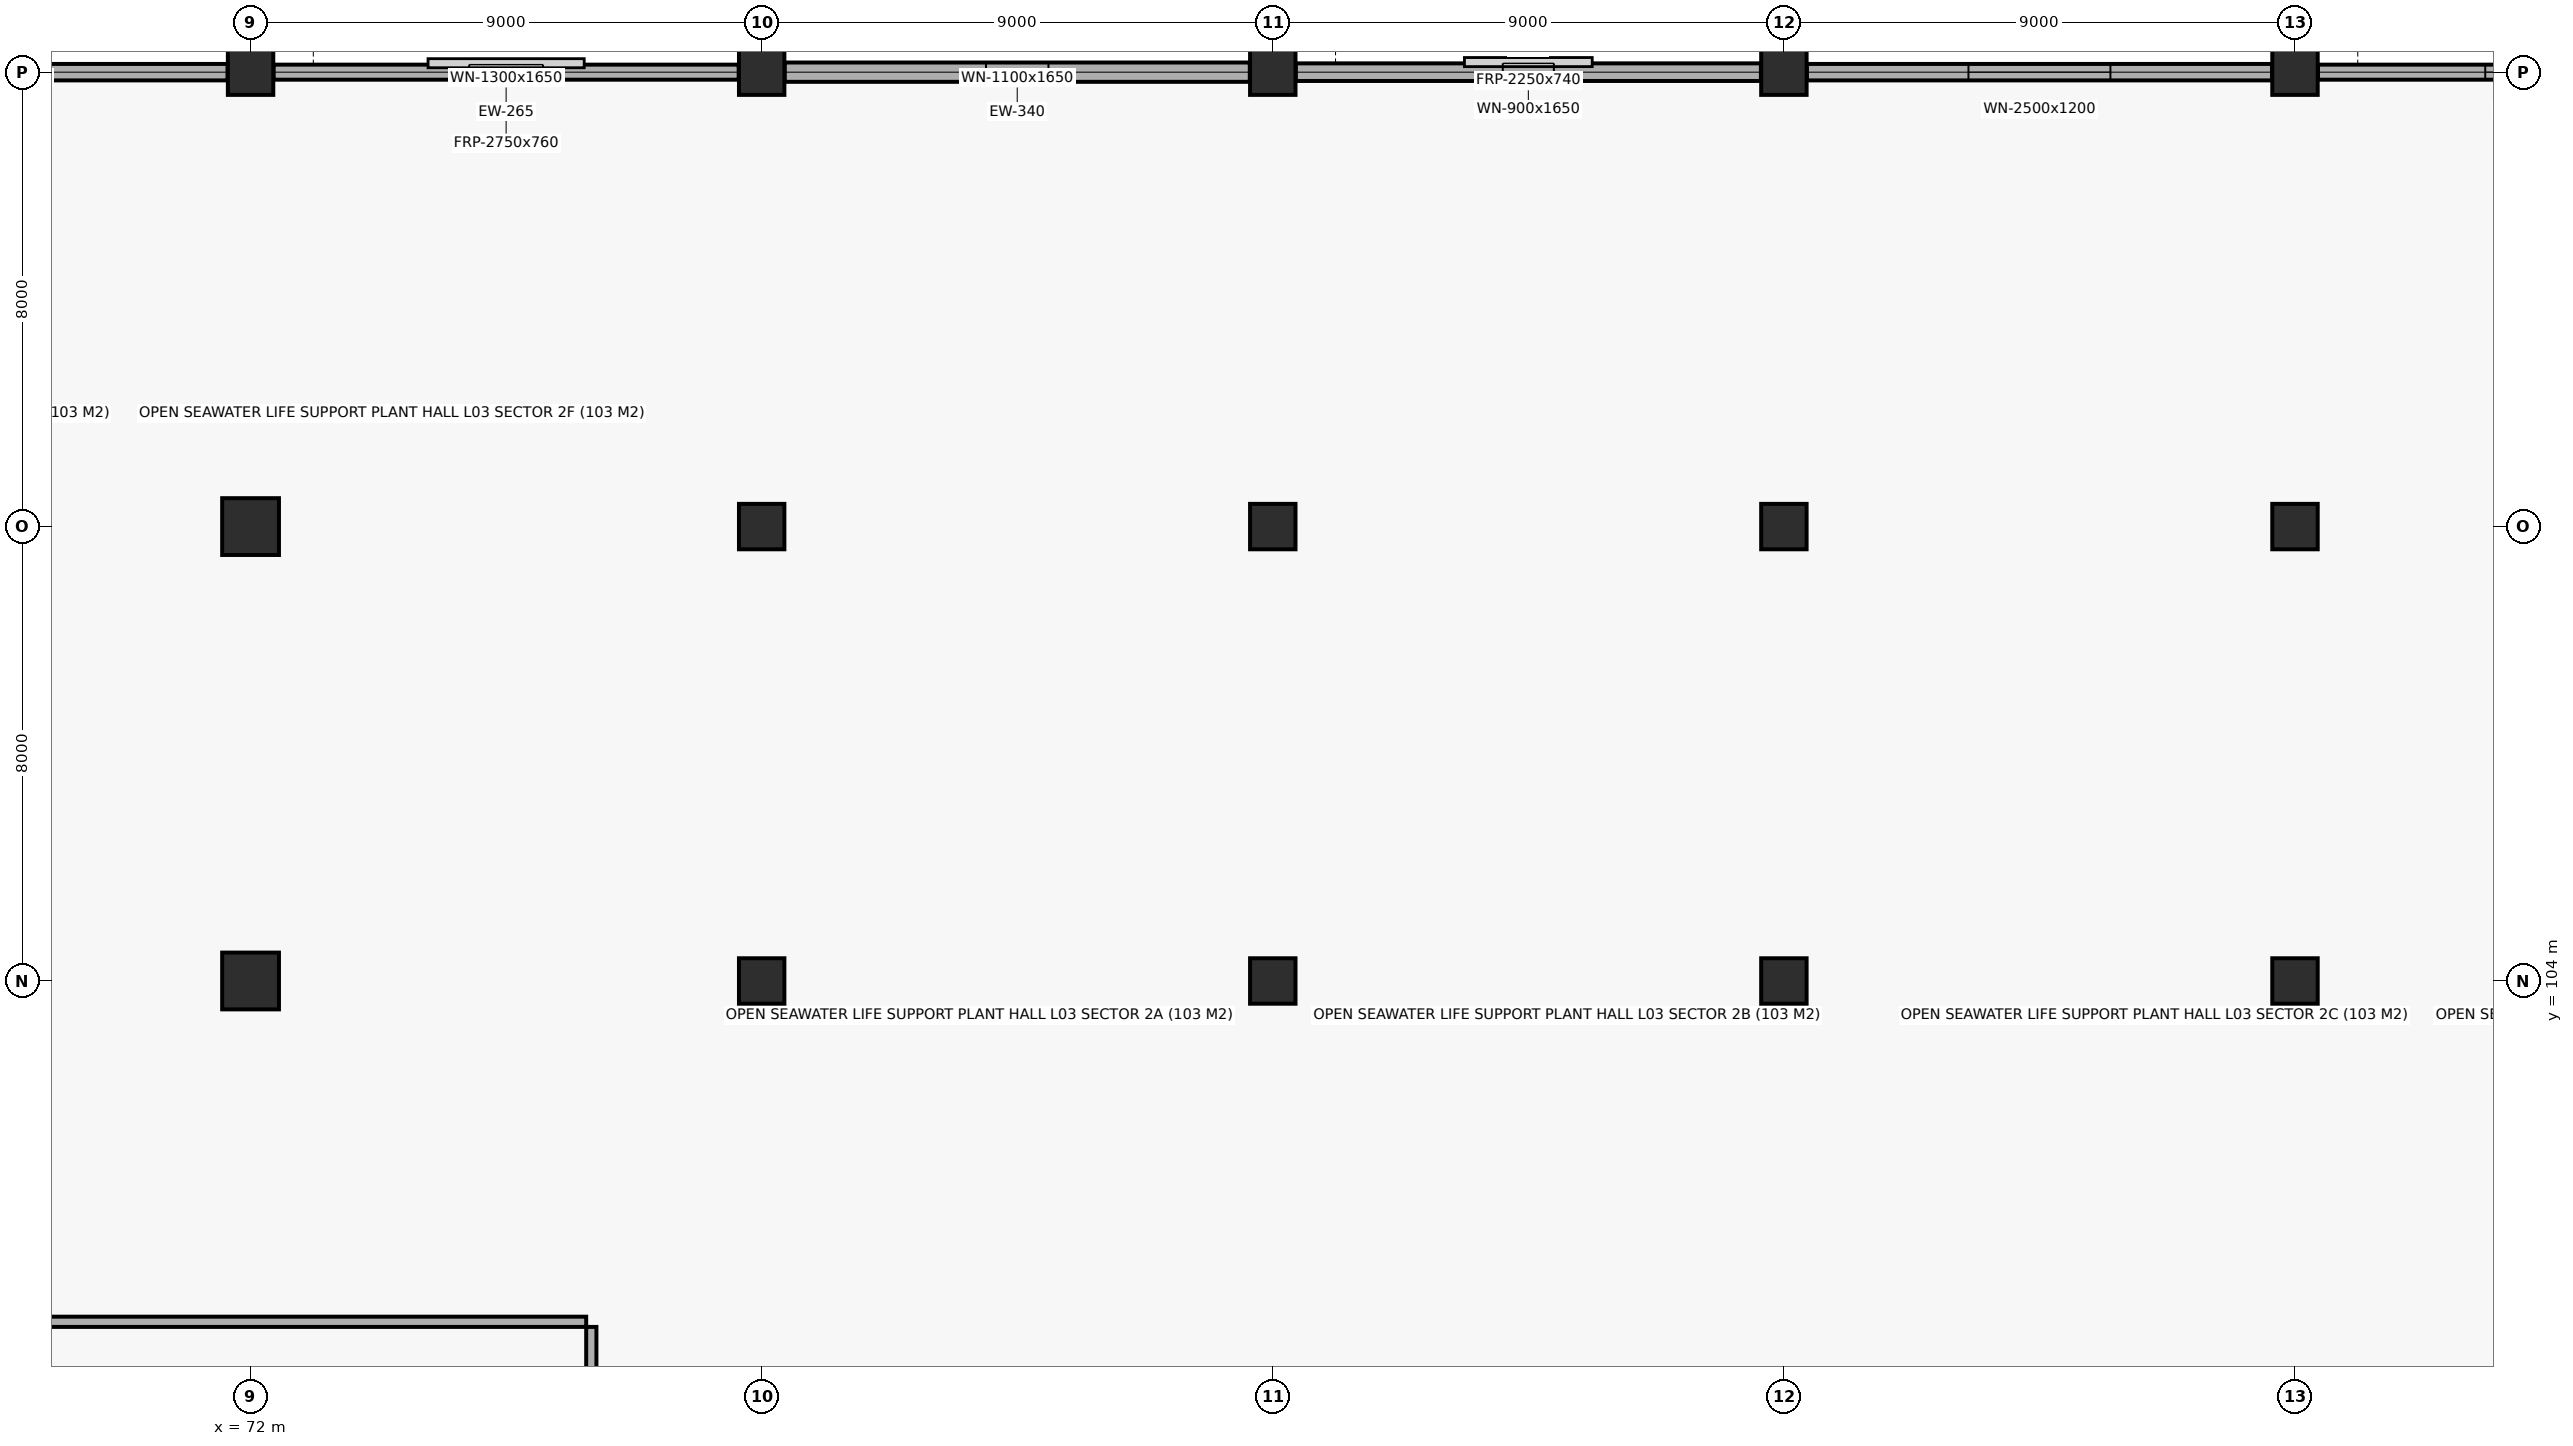
"""IFC4 building model, lengths in metres.
Left out: names, types, materials, properties, quantities, classifications, styles, units other than length and angle.
Written with IfcOpenShell. Run it as: python <this file> out.ifc"""

import sys

from ifc_helpers import new_model, si_unit, direction, frame, frame_2d, origin, origin_2d, place, context, subcontext, project, spatial, rectangle, extrude, element, fill, save


model = new_model("IFC4")
c1 = context("Model", 3, precision=1e-05, world=origin(), true_north=direction((0.0, 1.0)))
c2 = subcontext(c1, "Body", "Model", "MODEL_VIEW")
j1 = project(units=[si_unit("LENGTHUNIT", "METRE"), si_unit("PLANEANGLEUNIT", "RADIAN")], contexts=[c1])
p1 = place(None, origin())
s1 = spatial("IfcSite", under=j1, at=p1, CompositionType="ELEMENT")
p2 = place(p1, origin())
s2 = spatial("IfcBuilding", under=s1, at=p2, CompositionType="ELEMENT")
p3 = place(p2, frame((0.0, 0.0, 13.5)))
s3 = spatial("IfcBuildingStorey", under=s2, at=p3, CompositionType="ELEMENT", Elevation=13.5)
for number, where, z_axis, x_axis in (
    (1, (72.0, 104.0, 0.0), (0.0, 0.0, 1.0), (1.0, 0.0, 0.0)),
    (2, (72.0, 112.0, 0.0), (0.0, 0.0, 1.0), (1.0, 0.0, 0.0)),
):
    element("IfcColumn", number, at=place(p3, frame(where, z_axis=z_axis, x_axis=x_axis)), inside=s3, PredefinedType="COLUMN", context=c2, shape_type="SweptSolid", body=[
        extrude(rectangle(XDim=1.0, YDim=1.0, at=origin_2d()), origin(), (0.0, 0.0, 1.0), 4.5),
    ])
p4 = place(p3, frame((72.0, 120.0, 0.0), z_axis=(0.0, 0.0, 1.0), x_axis=(1.0, 0.0, 0.0)))
e3 = element("IfcColumn", 3, at=p4, inside=s3, PredefinedType="COLUMN", context=c2, shape_type="SweptSolid", body=[
    extrude(rectangle(XDim=0.8, YDim=0.8, at=origin_2d()), origin(), (0.0, 0.0, 1.0), 4.2),
])
for number, where, z_axis, x_axis in (
    (4, (81.0, 104.0, 0.0), (0.0, 0.0, 1.0), (1.0, 0.0, 0.0)),
    (5, (81.0, 112.0, 0.0), (0.0, 0.0, 1.0), (1.0, 0.0, 0.0)),
):
    element("IfcColumn", number, at=place(p3, frame(where, z_axis=z_axis, x_axis=x_axis)), inside=s3, PredefinedType="COLUMN", context=c2, shape_type="SweptSolid", body=[
        extrude(rectangle(XDim=0.8, YDim=0.8, at=origin_2d()), origin(), (0.0, 0.0, 1.0), 4.23),
    ])
p5 = place(p3, frame((81.0, 120.0, 0.0), z_axis=(0.0, 0.0, 1.0), x_axis=(1.0, 0.0, 0.0)))
e6 = element("IfcColumn", 6, at=p5, inside=s3, PredefinedType="COLUMN", context=c2, shape_type="SweptSolid", body=[
    extrude(rectangle(XDim=0.8, YDim=0.8, at=origin_2d()), origin(), (0.0, 0.0, 1.0), 4.2),
])
for number, where, z_axis, x_axis in (
    (7, (90.0, 104.0, 0.0), (0.0, 0.0, 1.0), (1.0, 0.0, 0.0)),
    (8, (90.0, 112.0, 0.0), (0.0, 0.0, 1.0), (1.0, 0.0, 0.0)),
):
    element("IfcColumn", number, at=place(p3, frame(where, z_axis=z_axis, x_axis=x_axis)), inside=s3, PredefinedType="COLUMN", context=c2, shape_type="SweptSolid", body=[
        extrude(rectangle(XDim=0.8, YDim=0.8, at=origin_2d()), origin(), (0.0, 0.0, 1.0), 4.23),
    ])
p6 = place(p3, frame((90.0, 120.0, 0.0), z_axis=(0.0, 0.0, 1.0), x_axis=(1.0, 0.0, 0.0)))
e9 = element("IfcColumn", 9, at=p6, inside=s3, PredefinedType="COLUMN", context=c2, shape_type="SweptSolid", body=[
    extrude(rectangle(XDim=0.8, YDim=0.8, at=origin_2d()), origin(), (0.0, 0.0, 1.0), 4.2),
])
for number, where, z_axis, x_axis in (
    (10, (99.0, 104.0, 0.0), (0.0, 0.0, 1.0), (1.0, 0.0, 0.0)),
    (11, (99.0, 112.0, 0.0), (0.0, 0.0, 1.0), (1.0, 0.0, 0.0)),
):
    element("IfcColumn", number, at=place(p3, frame(where, z_axis=z_axis, x_axis=x_axis)), inside=s3, PredefinedType="COLUMN", context=c2, shape_type="SweptSolid", body=[
        extrude(rectangle(XDim=0.8, YDim=0.8, at=origin_2d()), origin(), (0.0, 0.0, 1.0), 4.23),
    ])
p7 = place(p3, frame((99.0, 120.0, 0.0), z_axis=(0.0, 0.0, 1.0), x_axis=(1.0, 0.0, 0.0)))
e12 = element("IfcColumn", 12, at=p7, inside=s3, PredefinedType="COLUMN", context=c2, shape_type="SweptSolid", body=[
    extrude(rectangle(XDim=0.8, YDim=0.8, at=origin_2d()), origin(), (0.0, 0.0, 1.0), 4.2),
])
for number, where, z_axis, x_axis in (
    (13, (108.0, 104.0, 0.0), (0.0, 0.0, 1.0), (1.0, 0.0, 0.0)),
    (14, (108.0, 112.0, 0.0), (0.0, 0.0, 1.0), (1.0, 0.0, 0.0)),
):
    element("IfcColumn", number, at=place(p3, frame(where, z_axis=z_axis, x_axis=x_axis)), inside=s3, PredefinedType="COLUMN", context=c2, shape_type="SweptSolid", body=[
        extrude(rectangle(XDim=0.8, YDim=0.8, at=origin_2d()), origin(), (0.0, 0.0, 1.0), 4.23),
    ])
p8 = place(p3, frame((108.0, 120.0, 0.0), z_axis=(0.0, 0.0, 1.0), x_axis=(1.0, 0.0, 0.0)))
e15 = element("IfcColumn", 15, at=p8, inside=s3, PredefinedType="COLUMN", context=c2, shape_type="SweptSolid", body=[
    extrude(rectangle(XDim=0.8, YDim=0.8, at=origin_2d()), origin(), (0.0, 0.0, 1.0), 4.2),
])
p9 = place(p3, frame((63.405, 120.0, 0.0), z_axis=(0.0, 0.0, 1.0), x_axis=(1.0, 0.0, 0.0)))
e16 = element("IfcWall", 16, at=p9, inside=s3, PredefinedType="STANDARD", context=c2, shape_type="SweptSolid", body=[
    extrude(rectangle(XDim=8.19, YDim=0.29, at=frame_2d((4.095, 0.0))), origin(), (0.0, 0.0, 1.0), 3.48),
])
p10 = place(p9, frame((3.345, 0.0, 0.85)))
e17 = element("IfcOpeningElement", 17, at=p10, cuts=e16, PredefinedType="OPENING", context=c2, shape_type="SweptSolid", body=[
    extrude(rectangle(XDim=1.5, YDim=1.65, at=frame_2d((0.75, 0.825))), frame((0.0, 0.157, 0.0), z_axis=(0.0, -1.0, 0.0), x_axis=(1.0, 0.0, 0.0)), (0.0, 0.0, 1.0), 0.314),
])
p11 = place(p3, frame((72.405, 120.0, 0.0), z_axis=(0.0, 0.0, 1.0), x_axis=(1.0, 0.0, 0.0)))
e18 = element("IfcWall", 18, at=p11, inside=s3, PredefinedType="STANDARD", context=c2, shape_type="SweptSolid", body=[
    extrude(rectangle(XDim=8.19, YDim=0.265, at=frame_2d((4.095, 0.0))), origin(), (0.0, 0.0, 1.0), 3.48),
])
p12 = place(p11, frame((3.445, 0.0, 0.85)))
e19 = element("IfcOpeningElement", 19, at=p12, cuts=e18, PredefinedType="OPENING", context=c2, shape_type="SweptSolid", body=[
    extrude(rectangle(XDim=1.3, YDim=1.65, at=frame_2d((0.65, 0.825))), frame((0.0, 0.145, 0.0), z_axis=(0.0, -1.0, 0.0), x_axis=(1.0, 0.0, 0.0)), (0.0, 0.0, 1.0), 0.289),
])
p13 = place(p3, frame((81.405, 120.0, 0.0), z_axis=(0.0, 0.0, 1.0), x_axis=(1.0, 0.0, 0.0)))
e20 = element("IfcWall", 20, at=p13, inside=s3, PredefinedType="STANDARD", context=c2, shape_type="SweptSolid", body=[
    extrude(rectangle(XDim=8.19, YDim=0.34, at=frame_2d((4.095, 0.0))), origin(), (0.0, 0.0, 1.0), 3.48),
])
p14 = place(p13, frame((3.545, 0.0, 0.85)))
e21 = element("IfcOpeningElement", 21, at=p14, cuts=e20, PredefinedType="OPENING", context=c2, shape_type="SweptSolid", body=[
    extrude(rectangle(XDim=1.1, YDim=1.65, at=frame_2d((0.55, 0.825))), frame((0.0, 0.182, 0.0), z_axis=(0.0, -1.0, 0.0), x_axis=(1.0, 0.0, 0.0)), (0.0, 0.0, 1.0), 0.364),
])
p15 = place(p3, frame((90.405, 120.0, 0.0), z_axis=(0.0, 0.0, 1.0), x_axis=(1.0, 0.0, 0.0)))
e22 = element("IfcWall", 22, at=p15, inside=s3, PredefinedType="STANDARD", context=c2, shape_type="SweptSolid", body=[
    extrude(rectangle(XDim=8.19, YDim=0.31, at=frame_2d((4.095, 0.0))), origin(), (0.0, 0.0, 1.0), 3.48),
])
p16 = place(p15, frame((3.645, 0.0, 0.85)))
e23 = element("IfcOpeningElement", 23, at=p16, cuts=e22, PredefinedType="OPENING", context=c2, shape_type="SweptSolid", body=[
    extrude(rectangle(XDim=0.9, YDim=1.65, at=frame_2d((0.45, 0.825))), frame((0.0, 0.167, 0.0), z_axis=(0.0, -1.0, 0.0), x_axis=(1.0, 0.0, 0.0)), (0.0, 0.0, 1.0), 0.334),
])
p17 = place(p3, frame((99.405, 120.0, 0.0), z_axis=(0.0, 0.0, 1.0), x_axis=(1.0, 0.0, 0.0)))
e24 = element("IfcWall", 24, at=p17, inside=s3, PredefinedType="STANDARD", context=c2, shape_type="SweptSolid", body=[
    extrude(rectangle(XDim=8.19, YDim=0.29, at=frame_2d((4.095, 0.0))), origin(), (0.0, 0.0, 1.0), 3.48),
])
p18 = place(p17, frame((2.845, 0.0, 0.85)))
e25 = element("IfcOpeningElement", 25, at=p18, cuts=e24, PredefinedType="OPENING", context=c2, shape_type="SweptSolid", body=[
    extrude(rectangle(XDim=2.5, YDim=1.2, at=frame_2d((1.25, 0.6))), frame((0.0, 0.157, 0.0), z_axis=(0.0, -1.0, 0.0), x_axis=(1.0, 0.0, 0.0)), (0.0, 0.0, 1.0), 0.314),
])
p19 = place(p3, frame((108.405, 120.0, 0.0), z_axis=(0.0, 0.0, 1.0), x_axis=(1.0, 0.0, 0.0)))
e26 = element("IfcWall", 26, at=p19, inside=s3, PredefinedType="STANDARD", context=c2, shape_type="SweptSolid", body=[
    extrude(rectangle(XDim=8.19, YDim=0.265, at=frame_2d((4.095, 0.0))), origin(), (0.0, 0.0, 1.0), 3.48),
])
p20 = place(p19, frame((2.945, 0.0, 0.85)))
e27 = element("IfcOpeningElement", 27, at=p20, cuts=e26, PredefinedType="OPENING", context=c2, shape_type="SweptSolid", body=[
    extrude(rectangle(XDim=2.3, YDim=1.2, at=frame_2d((1.15, 0.6))), frame((0.0, 0.145, 0.0), z_axis=(0.0, -1.0, 0.0), x_axis=(1.0, 0.0, 0.0)), (0.0, 0.0, 1.0), 0.289),
])
p21 = place(p3, frame((55.09, 98.0, 0.0), z_axis=(0.0, 0.0, 1.0), x_axis=(1.0, 0.0, 0.0)))
e28 = element("IfcWall", 28, at=p21, inside=s3, PredefinedType="PARTITIONING", context=c2, shape_type="SweptSolid", body=[
    extrude(rectangle(XDim=22.82, YDim=0.18, at=frame_2d((11.41, 0.0))), origin(), (0.0, 0.0, 1.0), 4.2),
])
p22 = place(p3, frame((78.0, 82.09, 0.0), z_axis=(0.0, 0.0, 1.0), x_axis=(0.0, 1.0, 0.0)))
e29 = element("IfcWall", 29, at=p22, inside=s3, PredefinedType="PARTITIONING", context=c2, shape_type="SweptSolid", body=[
    extrude(rectangle(XDim=15.82, YDim=0.18, at=frame_2d((7.91, 0.0))), origin(), (0.0, 0.0, 1.0), 4.2),
])
p23 = place(p12, origin())
e30 = element("IfcWindow", 30, at=p23, inside=s3, PartitioningType="SINGLE_PANEL", PredefinedType="WINDOW", context=c2, shape_type="SweptSolid", body=[
    extrude(rectangle(XDim=1.3, YDim=1.65, at=frame_2d((0.65, 0.825))), frame((0.0, 0.03, 0.0), z_axis=(0.0, -1.0, 0.0), x_axis=(1.0, 0.0, 0.0)), (0.0, 0.0, 1.0), 0.06),
])
fill(e19, e30)
p24 = place(p14, origin())
e31 = element("IfcWindow", 31, at=p24, inside=s3, PartitioningType="SINGLE_PANEL", PredefinedType="WINDOW", context=c2, shape_type="SweptSolid", body=[
    extrude(rectangle(XDim=1.1, YDim=1.65, at=frame_2d((0.55, 0.825))), frame((0.0, 0.03, 0.0), z_axis=(0.0, -1.0, 0.0), x_axis=(1.0, 0.0, 0.0)), (0.0, 0.0, 1.0), 0.06),
])
fill(e21, e31)
p25 = place(p16, origin())
e32 = element("IfcWindow", 32, at=p25, inside=s3, PartitioningType="SINGLE_PANEL", PredefinedType="WINDOW", context=c2, shape_type="SweptSolid", body=[
    extrude(rectangle(XDim=0.9, YDim=1.65, at=frame_2d((0.45, 0.825))), frame((0.0, 0.03, 0.0), z_axis=(0.0, -1.0, 0.0), x_axis=(1.0, 0.0, 0.0)), (0.0, 0.0, 1.0), 0.06),
])
fill(e23, e32)
p26 = place(p18, origin())
e33 = element("IfcWindow", 33, at=p26, inside=s3, PartitioningType="SINGLE_PANEL", PredefinedType="WINDOW", context=c2, shape_type="SweptSolid", body=[
    extrude(rectangle(XDim=2.5, YDim=1.2, at=frame_2d((1.25, 0.6))), frame((0.0, 0.03, 0.0), z_axis=(0.0, -1.0, 0.0), x_axis=(1.0, 0.0, 0.0)), (0.0, 0.0, 1.0), 0.06),
])
fill(e25, e33)
p27 = place(p20, origin())
e34 = element("IfcWindow", 34, at=p27, inside=s3, PartitioningType="SINGLE_PANEL", PredefinedType="WINDOW", context=c2, shape_type="SweptSolid", body=[
    extrude(rectangle(XDim=2.3, YDim=1.2, at=frame_2d((1.15, 0.6))), frame((0.0, 0.03, 0.0), z_axis=(0.0, -1.0, 0.0), x_axis=(1.0, 0.0, 0.0)), (0.0, 0.0, 1.0), 0.06),
])
fill(e27, e34)
save(model, sys.argv[1])
